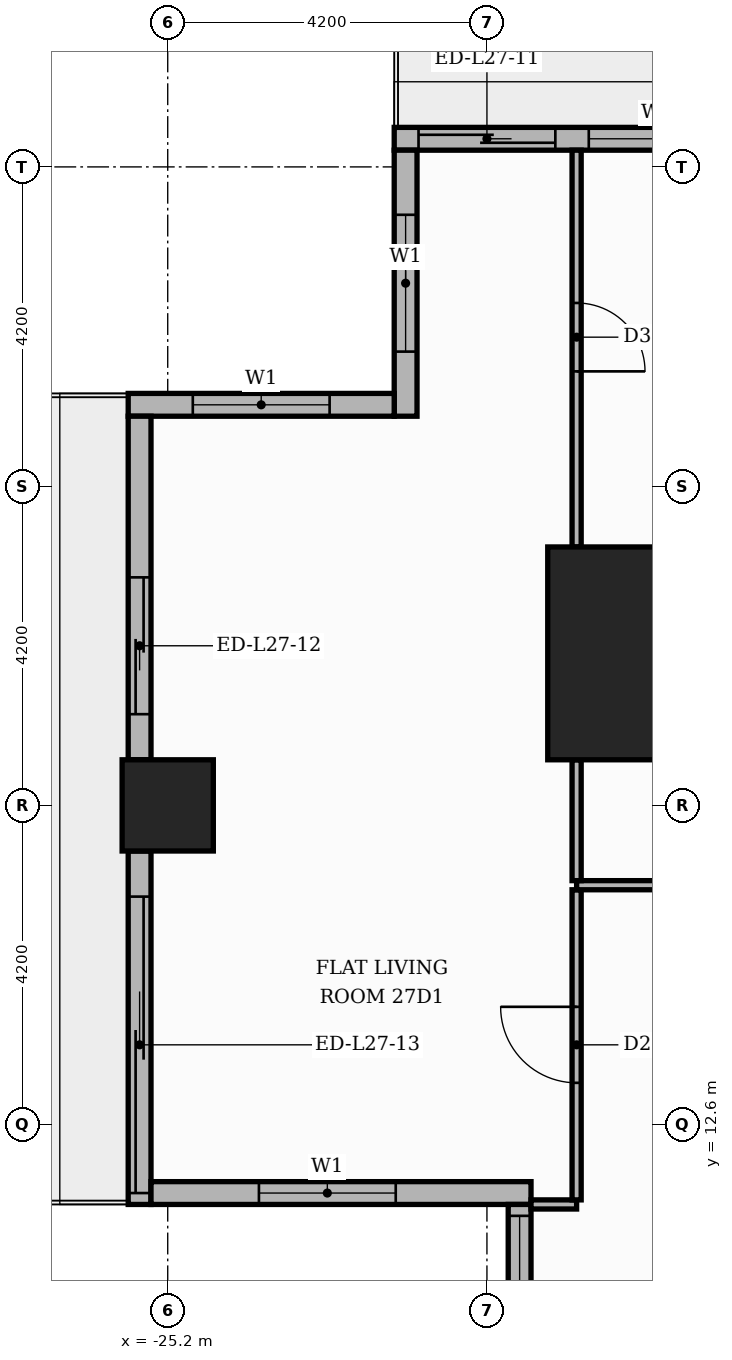
"""IFC4 building model, lengths in metres.
Left out: names, types, materials, properties, quantities, classifications, styles, units other than length and angle.
Written with IfcOpenShell. Run it as: python <this file> out.ifc"""

import sys

from ifc_helpers import new_model, si_unit, direction, frame, frame_2d, origin, origin_2d, place, context, subcontext, project, spatial, rectangle, extrude, element, fill, save


model = new_model("IFC4")
c1 = context("Model", 3, precision=1e-05, world=origin(), true_north=direction((0.0, 1.0)))
c2 = subcontext(c1, "Body", "Model", "MODEL_VIEW")
j1 = project(units=[si_unit("LENGTHUNIT", "METRE"), si_unit("PLANEANGLEUNIT", "RADIAN")], contexts=[c1])
p1 = place(None, origin())
s1 = spatial("IfcSite", under=j1, at=p1, CompositionType="ELEMENT")
p2 = place(p1, origin())
s2 = spatial("IfcBuilding", under=s1, at=p2, CompositionType="ELEMENT")
p3 = place(p2, frame((0.0, 0.0, 114.3)))
s3 = spatial("IfcBuildingStorey", under=s2, at=p3, CompositionType="ELEMENT", Elevation=114.3)
p4 = place(p3, frame((-18.8, 18.8, 0.0), z_axis=(0.0, 0.0, 1.0), x_axis=(1.0, 0.0, 0.0)))
e1 = element("IfcColumn", 1, at=p4, inside=s3, PredefinedType="COLUMN", context=c2, shape_type="SweptSolid", body=[
    extrude(rectangle(XDim=2.8, YDim=2.8, at=origin_2d()), origin(), (0.0, 0.0, 1.0), 3.9),
])
p5 = place(p3, frame((-25.2, 16.8, 0.0), z_axis=(0.0, 0.0, 1.0), x_axis=(1.0, 0.0, 0.0)))
e2 = element("IfcColumn", 2, at=p5, inside=s3, PredefinedType="COLUMN", context=c2, shape_type="SweptSolid", body=[
    extrude(rectangle(XDim=1.2, YDim=1.2, at=origin_2d()), origin(), (0.0, 0.0, 1.0), 3.9),
])
p6 = place(p3, frame((-17.4, 25.57, 0.0), z_axis=(0.0, 0.0, 1.0), x_axis=(-1.0, 0.0, 0.0)))
e3 = element("IfcWall", 3, at=p6, inside=s3, PredefinedType="STANDARD", context=c2, shape_type="SweptSolid", body=[
    extrude(rectangle(XDim=4.82, YDim=0.3, at=frame_2d((2.41, 0.0))), origin(), (0.0, 0.0, 1.0), 3.48),
])
p7 = place(p6, frame((2.7, 0.0, 0.0)))
e4 = element("IfcOpeningElement", 4, at=p7, cuts=e3, PredefinedType="OPENING", context=c2, shape_type="SweptSolid", body=[
    extrude(rectangle(XDim=1.8, YDim=2.4, at=frame_2d((0.9, 1.2))), frame((0.0, 0.16, 0.0), z_axis=(0.0, -1.0, 0.0), x_axis=(1.0, 0.0, 0.0)), (0.0, 0.0, 1.0), 0.32),
])
p8 = place(p6, frame((0.46, 0.0, 0.9)))
e5 = element("IfcOpeningElement", 5, at=p8, cuts=e3, PredefinedType="OPENING", context=c2, shape_type="SweptSolid", body=[
    extrude(rectangle(XDim=1.8, YDim=2.1, at=frame_2d((0.9, 1.05))), frame((0.0, 0.16, 0.0), z_axis=(0.0, -1.0, 0.0), x_axis=(1.0, 0.0, 0.0)), (0.0, 0.0, 1.0), 0.32),
])
p9 = place(p3, frame((-22.07, 25.42, 0.0), z_axis=(0.0, 0.0, 1.0), x_axis=(0.0, -1.0, 0.0)))
e6 = element("IfcWall", 6, at=p9, inside=s3, PredefinedType="STANDARD", context=c2, shape_type="SweptSolid", body=[
    extrude(rectangle(XDim=3.5, YDim=0.3, at=frame_2d((1.75, 0.0))), origin(), (0.0, 0.0, 1.0), 3.48),
])
p10 = place(p9, frame((0.85, 0.0, 0.9)))
e7 = element("IfcOpeningElement", 7, at=p10, cuts=e6, PredefinedType="OPENING", context=c2, shape_type="SweptSolid", body=[
    extrude(rectangle(XDim=1.8, YDim=2.1, at=frame_2d((0.9, 1.05))), frame((0.0, 0.16, 0.0), z_axis=(0.0, -1.0, 0.0), x_axis=(1.0, 0.0, 0.0)), (0.0, 0.0, 1.0), 0.32),
])
p11 = place(p3, frame((-22.22, 22.07, 0.0), z_axis=(0.0, 0.0, 1.0), x_axis=(-1.0, 0.0, 0.0)))
e8 = element("IfcWall", 8, at=p11, inside=s3, PredefinedType="STANDARD", context=c2, shape_type="SweptSolid", body=[
    extrude(rectangle(XDim=3.5, YDim=0.3, at=frame_2d((1.75, 0.0))), origin(), (0.0, 0.0, 1.0), 3.48),
])
p12 = place(p11, frame((0.85, 0.0, 0.9)))
e9 = element("IfcOpeningElement", 9, at=p12, cuts=e8, PredefinedType="OPENING", context=c2, shape_type="SweptSolid", body=[
    extrude(rectangle(XDim=1.8, YDim=2.1, at=frame_2d((0.9, 1.05))), frame((0.0, 0.16, 0.0), z_axis=(0.0, -1.0, 0.0), x_axis=(1.0, 0.0, 0.0)), (0.0, 0.0, 1.0), 0.32),
])
p13 = place(p3, frame((-25.57, 21.92, 0.0), z_axis=(0.0, 0.0, 1.0), x_axis=(0.0, -1.0, 0.0)))
e10 = element("IfcWall", 10, at=p13, inside=s3, PredefinedType="STANDARD", context=c2, shape_type="SweptSolid", body=[
    extrude(rectangle(XDim=4.52, YDim=0.3, at=frame_2d((2.26, 0.0))), origin(), (0.0, 0.0, 1.0), 3.48),
])
p14 = place(p13, frame((2.12, 0.0, 0.0)))
e11 = element("IfcOpeningElement", 11, at=p14, cuts=e10, PredefinedType="OPENING", context=c2, shape_type="SweptSolid", body=[
    extrude(rectangle(XDim=1.8, YDim=2.4, at=frame_2d((0.9, 1.2))), frame((0.0, 0.16, 0.0), z_axis=(0.0, -1.0, 0.0), x_axis=(1.0, 0.0, 0.0)), (0.0, 0.0, 1.0), 0.32),
])
p15 = place(p3, frame((-25.57, 16.2, 0.0), z_axis=(0.0, 0.0, 1.0), x_axis=(0.0, -1.0, 0.0)))
e12 = element("IfcWall", 12, at=p15, inside=s3, PredefinedType="STANDARD", context=c2, shape_type="SweptSolid", body=[
    extrude(rectangle(XDim=4.65, YDim=0.3, at=frame_2d((2.325, 0.0))), origin(), (0.0, 0.0, 1.0), 3.48),
])
p16 = place(p15, frame((0.6, 0.0, 0.0)))
e13 = element("IfcOpeningElement", 13, at=p16, cuts=e12, PredefinedType="OPENING", context=c2, shape_type="SweptSolid", body=[
    extrude(rectangle(XDim=3.9, YDim=2.4, at=frame_2d((1.95, 1.2))), frame((0.0, 0.16, 0.0), z_axis=(0.0, -1.0, 0.0), x_axis=(1.0, 0.0, 0.0)), (0.0, 0.0, 1.0), 0.32),
])
p17 = place(p3, frame((-25.42, 11.7, 0.0), z_axis=(0.0, 0.0, 1.0), x_axis=(1.0, 0.0, 0.0)))
e14 = element("IfcWall", 14, at=p17, inside=s3, PredefinedType="STANDARD", context=c2, shape_type="SweptSolid", body=[
    extrude(rectangle(XDim=5.0, YDim=0.3, at=frame_2d((2.5, 0.0))), origin(), (0.0, 0.0, 1.0), 3.48),
])
p18 = place(p17, frame((1.42, 0.0, 0.9)))
e15 = element("IfcOpeningElement", 15, at=p18, cuts=e14, PredefinedType="OPENING", context=c2, shape_type="SweptSolid", body=[
    extrude(rectangle(XDim=1.8, YDim=2.1, at=frame_2d((0.9, 1.05))), frame((0.0, 0.16, 0.0), z_axis=(0.0, -1.0, 0.0), x_axis=(1.0, 0.0, 0.0)), (0.0, 0.0, 1.0), 0.32),
])
p19 = place(p3, frame((-20.57, 11.55, 0.0), z_axis=(0.0, 0.0, 1.0), x_axis=(0.0, -1.0, 0.0)))
e16 = element("IfcWall", 16, at=p19, inside=s3, PredefinedType="STANDARD", context=c2, shape_type="SweptSolid", body=[
    extrude(rectangle(XDim=23.4, YDim=0.3, at=frame_2d((11.7, 0.0))), origin(), (0.0, 0.0, 1.0), 3.48),
])
p20 = place(p19, frame((0.15, 0.0, 0.9)))
e17 = element("IfcOpeningElement", 17, at=p20, cuts=e16, PredefinedType="OPENING", context=c2, shape_type="SweptSolid", body=[
    extrude(rectangle(XDim=6.0, YDim=2.1, at=frame_2d((3.0, 1.05))), frame((0.0, 0.16, 0.0), z_axis=(0.0, -1.0, 0.0), x_axis=(1.0, 0.0, 0.0)), (0.0, 0.0, 1.0), 0.32),
])
p21 = place(p19, frame((6.45, 0.0, 0.9)))
e18 = element("IfcOpeningElement", 18, at=p21, cuts=e16, PredefinedType="OPENING", context=c2, shape_type="SweptSolid", body=[
    extrude(rectangle(XDim=6.0, YDim=2.1, at=frame_2d((3.0, 1.05))), frame((0.0, 0.16, 0.0), z_axis=(0.0, -1.0, 0.0), x_axis=(1.0, 0.0, 0.0)), (0.0, 0.0, 1.0), 0.32),
])
p22 = place(p19, frame((12.75, 0.0, 0.9)))
e19 = element("IfcOpeningElement", 19, at=p22, cuts=e16, PredefinedType="OPENING", context=c2, shape_type="SweptSolid", body=[
    extrude(rectangle(XDim=6.0, YDim=2.1, at=frame_2d((3.0, 1.05))), frame((0.0, 0.16, 0.0), z_axis=(0.0, -1.0, 0.0), x_axis=(1.0, 0.0, 0.0)), (0.0, 0.0, 1.0), 0.32),
])
p23 = place(p19, frame((19.05, 0.0, 0.9)))
e20 = element("IfcOpeningElement", 20, at=p23, cuts=e16, PredefinedType="OPENING", context=c2, shape_type="SweptSolid", body=[
    extrude(rectangle(XDim=3.9, YDim=2.1, at=frame_2d((1.95, 1.05))), frame((0.0, 0.16, 0.0), z_axis=(0.0, -1.0, 0.0), x_axis=(1.0, 0.0, 0.0)), (0.0, 0.0, 1.0), 0.32),
])
p24 = place(p3, frame((-20.42, 11.55, 0.0), z_axis=(0.0, 0.0, 1.0), x_axis=(1.0, 0.0, 0.0)))
e21 = element("IfcWall", 21, at=p24, inside=s3, PredefinedType="PARTITIONING", context=c2, shape_type="SweptSolid", body=[
    extrude(rectangle(XDim=0.6, YDim=0.12, at=frame_2d((0.3, 0.0))), origin(), (0.0, 0.0, 1.0), 3.48),
])
p25 = place(p3, frame((-19.82, 11.61, 0.0), z_axis=(0.0, 0.0, 1.0), x_axis=(0.0, 1.0, 0.0)))
e22 = element("IfcWall", 22, at=p25, inside=s3, PredefinedType="PARTITIONING", context=c2, shape_type="SweptSolid", body=[
    extrude(rectangle(XDim=4.08, YDim=0.12, at=frame_2d((2.04, 0.0))), origin(), (0.0, 0.0, 1.0), 3.48),
])
p26 = place(p25, frame((1.54, 0.0, 0.0)))
e23 = element("IfcOpeningElement", 23, at=p26, cuts=e22, PredefinedType="OPENING", context=c2, shape_type="SweptSolid", body=[
    extrude(rectangle(XDim=1.0, YDim=2.1, at=frame_2d((0.5, 1.05))), frame((0.0, 0.07, 0.0), z_axis=(0.0, -1.0, 0.0), x_axis=(1.0, 0.0, 0.0)), (0.0, 0.0, 1.0), 0.14),
])
p27 = place(p3, frame((-19.82, 15.75, 0.0), z_axis=(0.0, 0.0, 1.0), x_axis=(1.0, 0.0, 0.0)))
e24 = element("IfcWall", 24, at=p27, inside=s3, PredefinedType="PARTITIONING", context=c2, shape_type="SweptSolid", body=[
    extrude(rectangle(XDim=6.07, YDim=0.12, at=frame_2d((3.035, 0.0))), origin(), (0.0, 0.0, 1.0), 3.48),
])
p28 = place(p27, frame((2.585, 0.0, 0.0)))
e25 = element("IfcOpeningElement", 25, at=p28, cuts=e24, PredefinedType="OPENING", context=c2, shape_type="SweptSolid", body=[
    extrude(rectangle(XDim=1.0, YDim=2.1, at=frame_2d((0.5, 1.05))), frame((0.0, 0.07, 0.0), z_axis=(0.0, -1.0, 0.0), x_axis=(1.0, 0.0, 0.0)), (0.0, 0.0, 1.0), 0.14),
])
p29 = place(p3, frame((-19.82, 15.81, 0.0), z_axis=(0.0, 0.0, 1.0), x_axis=(0.0, 1.0, 0.0)))
e26 = element("IfcWall", 26, at=p29, inside=s3, PredefinedType="PARTITIONING", context=c2, shape_type="SweptSolid", body=[
    extrude(rectangle(XDim=1.59, YDim=0.12, at=frame_2d((0.795, 0.0))), origin(), (0.0, 0.0, 1.0), 3.48),
])
p30 = place(p3, frame((-19.82, 20.2, 0.0), z_axis=(0.0, 0.0, 1.0), x_axis=(0.0, 1.0, 0.0)))
e27 = element("IfcWall", 27, at=p30, inside=s3, PredefinedType="PARTITIONING", context=c2, shape_type="SweptSolid", body=[
    extrude(rectangle(XDim=5.22, YDim=0.12, at=frame_2d((2.61, 0.0))), origin(), (0.0, 0.0, 1.0), 3.48),
])
p31 = place(p30, frame((2.31, 0.0, 0.0)))
e28 = element("IfcOpeningElement", 28, at=p31, cuts=e27, PredefinedType="OPENING", context=c2, shape_type="SweptSolid", body=[
    extrude(rectangle(XDim=0.9, YDim=2.1, at=frame_2d((0.45, 1.05))), frame((0.0, 0.07, 0.0), z_axis=(0.0, -1.0, 0.0), x_axis=(1.0, 0.0, 0.0)), (0.0, 0.0, 1.0), 0.14),
])
p32 = place(p7, origin())
e29 = element("IfcDoor", 29, at=p32, inside=s3, OperationType="SLIDING_TO_LEFT", PredefinedType="DOOR", context=c2, shape_type="SweptSolid", body=[
    extrude(rectangle(XDim=1.8, YDim=2.4, at=frame_2d((0.9, 1.2))), frame((0.0, 0.025, 0.0), z_axis=(0.0, -1.0, 0.0), x_axis=(1.0, 0.0, 0.0)), (0.0, 0.0, 1.0), 0.05),
])
fill(e4, e29)
p33 = place(p8, origin())
e30 = element("IfcWindow", 30, at=p33, inside=s3, PartitioningType="SINGLE_PANEL", PredefinedType="WINDOW", context=c2, shape_type="SweptSolid", body=[
    extrude(rectangle(XDim=1.8, YDim=2.1, at=frame_2d((0.9, 1.05))), frame((0.0, 0.03, 0.0), z_axis=(0.0, -1.0, 0.0), x_axis=(1.0, 0.0, 0.0)), (0.0, 0.0, 1.0), 0.06),
])
fill(e5, e30)
p34 = place(p10, origin())
e31 = element("IfcWindow", 31, at=p34, inside=s3, PartitioningType="SINGLE_PANEL", PredefinedType="WINDOW", context=c2, shape_type="SweptSolid", body=[
    extrude(rectangle(XDim=1.8, YDim=2.1, at=frame_2d((0.9, 1.05))), frame((0.0, 0.03, 0.0), z_axis=(0.0, -1.0, 0.0), x_axis=(1.0, 0.0, 0.0)), (0.0, 0.0, 1.0), 0.06),
])
fill(e7, e31)
p35 = place(p12, origin())
e32 = element("IfcWindow", 32, at=p35, inside=s3, PartitioningType="SINGLE_PANEL", PredefinedType="WINDOW", context=c2, shape_type="SweptSolid", body=[
    extrude(rectangle(XDim=1.8, YDim=2.1, at=frame_2d((0.9, 1.05))), frame((0.0, 0.03, 0.0), z_axis=(0.0, -1.0, 0.0), x_axis=(1.0, 0.0, 0.0)), (0.0, 0.0, 1.0), 0.06),
])
fill(e9, e32)
p36 = place(p14, origin())
e33 = element("IfcDoor", 33, at=p36, inside=s3, OperationType="SLIDING_TO_RIGHT", PredefinedType="DOOR", context=c2, shape_type="SweptSolid", body=[
    extrude(rectangle(XDim=1.8, YDim=2.4, at=frame_2d((0.9, 1.2))), frame((0.0, 0.025, 0.0), z_axis=(0.0, -1.0, 0.0), x_axis=(1.0, 0.0, 0.0)), (0.0, 0.0, 1.0), 0.05),
])
fill(e11, e33)
p37 = place(p16, origin())
e34 = element("IfcDoor", 34, at=p37, inside=s3, OperationType="SLIDING_TO_LEFT", PredefinedType="DOOR", context=c2, shape_type="SweptSolid", body=[
    extrude(rectangle(XDim=3.9, YDim=2.4, at=frame_2d((1.95, 1.2))), frame((0.0, 0.025, 0.0), z_axis=(0.0, -1.0, 0.0), x_axis=(1.0, 0.0, 0.0)), (0.0, 0.0, 1.0), 0.05),
])
fill(e13, e34)
p38 = place(p18, origin())
e35 = element("IfcWindow", 35, at=p38, inside=s3, PartitioningType="SINGLE_PANEL", PredefinedType="WINDOW", context=c2, shape_type="SweptSolid", body=[
    extrude(rectangle(XDim=1.8, YDim=2.1, at=frame_2d((0.9, 1.05))), frame((0.0, 0.03, 0.0), z_axis=(0.0, -1.0, 0.0), x_axis=(1.0, 0.0, 0.0)), (0.0, 0.0, 1.0), 0.06),
])
fill(e15, e35)
p39 = place(p20, origin())
e36 = element("IfcWindow", 36, at=p39, inside=s3, PartitioningType="SINGLE_PANEL", PredefinedType="WINDOW", context=c2, shape_type="SweptSolid", body=[
    extrude(rectangle(XDim=6.0, YDim=2.1, at=frame_2d((3.0, 1.05))), frame((0.0, 0.03, 0.0), z_axis=(0.0, -1.0, 0.0), x_axis=(1.0, 0.0, 0.0)), (0.0, 0.0, 1.0), 0.06),
])
fill(e17, e36)
p40 = place(p31, frame((0.9, 0.0, 0.0), z_axis=(0.0, 0.0, 1.0), x_axis=(-1.0, 0.0, 0.0)))
e37 = element("IfcDoor", 37, at=p40, inside=s3, OperationType="SINGLE_SWING_LEFT", PredefinedType="DOOR", context=c2, shape_type="SweptSolid", body=[
    extrude(rectangle(XDim=0.9, YDim=2.1, at=frame_2d((0.45, 1.05))), frame((0.0, 0.025, 0.0), z_axis=(0.0, -1.0, 0.0), x_axis=(1.0, 0.0, 0.0)), (0.0, 0.0, 1.0), 0.05),
])
fill(e28, e37)
p41 = place(p26, origin())
e38 = element("IfcDoor", 38, at=p41, inside=s3, OperationType="SINGLE_SWING_RIGHT", PredefinedType="DOOR", context=c2, shape_type="SweptSolid", body=[
    extrude(rectangle(XDim=1.0, YDim=2.1, at=frame_2d((0.5, 1.05))), frame((0.0, 0.025, 0.0), z_axis=(0.0, -1.0, 0.0), x_axis=(1.0, 0.0, 0.0)), (0.0, 0.0, 1.0), 0.05),
])
fill(e23, e38)
save(model, sys.argv[1])
